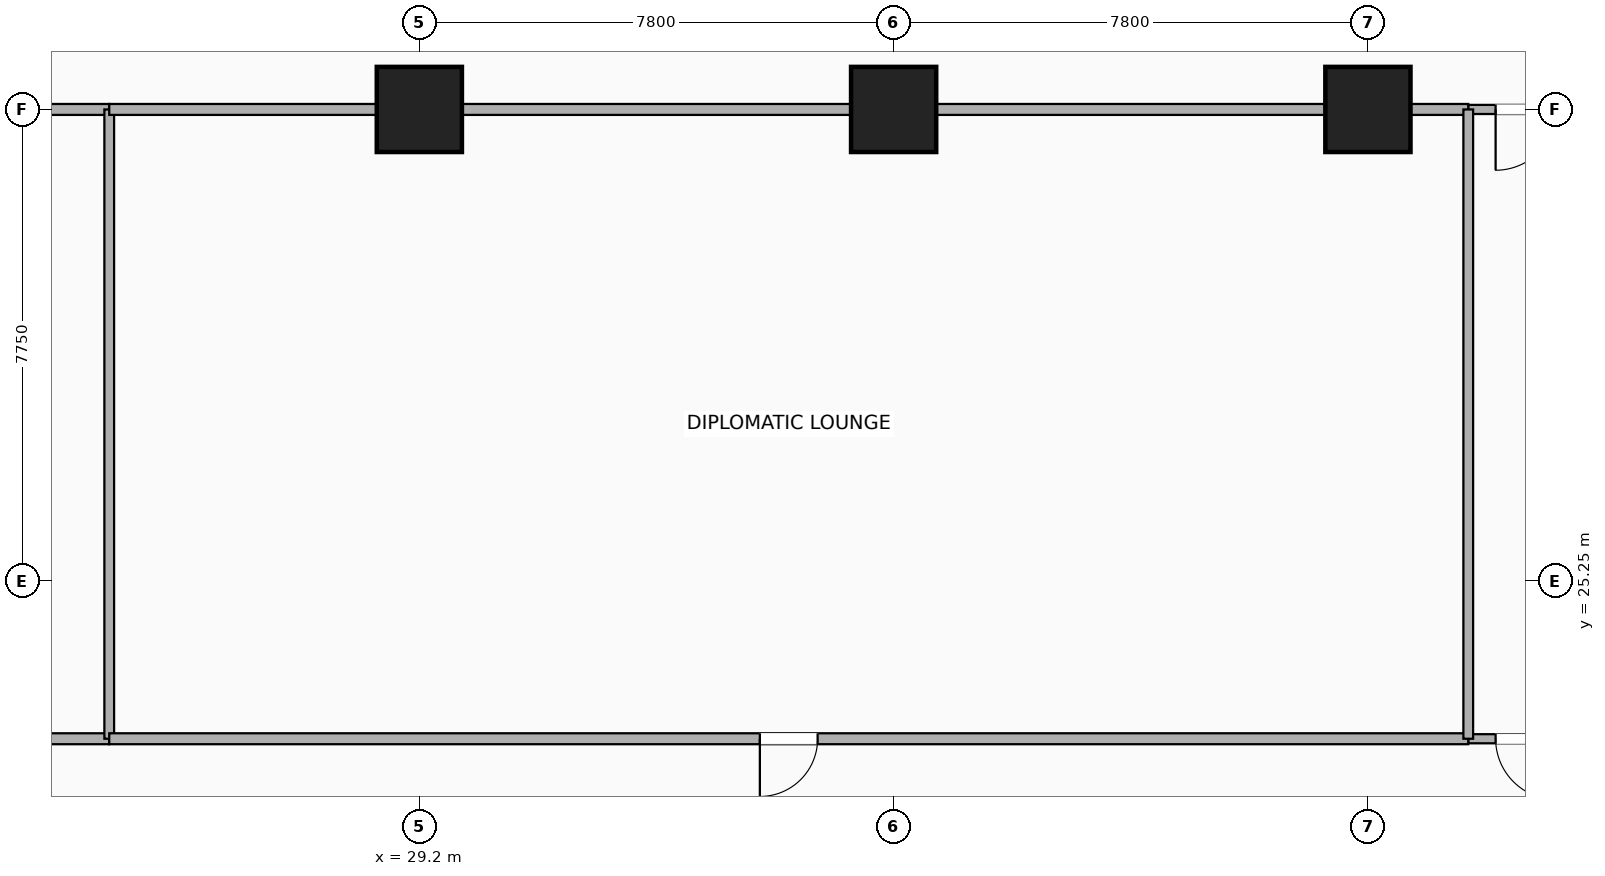
"""IFC4 building model, lengths in metres.
Left out: names, types, materials, properties, quantities, classifications, styles, units other than length and angle.
Written with IfcOpenShell. Run it as: python <this file> out.ifc"""

import sys

from ifc_helpers import new_model, si_unit, direction, frame, frame_2d, origin, origin_2d, place, context, subcontext, project, spatial, rectangle, extrude, element, fill, save


model = new_model("IFC4")
c1 = context("Model", 3, precision=1e-05, world=origin(), true_north=direction((0.0, 1.0)))
c2 = subcontext(c1, "Body", "Model", "MODEL_VIEW")
j1 = project(units=[si_unit("LENGTHUNIT", "METRE"), si_unit("PLANEANGLEUNIT", "RADIAN")], contexts=[c1])
p1 = place(None, origin())
s1 = spatial("IfcSite", under=j1, at=p1, CompositionType="ELEMENT")
p2 = place(p1, origin())
s2 = spatial("IfcBuilding", under=s1, at=p2, CompositionType="ELEMENT")
p3 = place(p2, frame((0.0, 0.0, 64.9)))
s3 = spatial("IfcBuildingStorey", under=s2, at=p3, CompositionType="ELEMENT", Elevation=64.9)
for number, where, z_axis, x_axis in (
    (1, (29.2, 33.0, -0.28), (0.0, 0.0, 1.0), (1.0, 0.0, 0.0)),
    (2, (37.0, 33.0, -0.28), (0.0, 0.0, 1.0), (1.0, 0.0, 0.0)),
    (3, (44.8, 33.0, -0.28), (0.0, 0.0, 1.0), (1.0, 0.0, 0.0)),
):
    element("IfcColumn", number, at=place(p3, frame(where, z_axis=z_axis, x_axis=x_axis)), inside=s3, PredefinedType="COLUMN", context=c2, shape_type="SweptSolid", body=[
        extrude(rectangle(XDim=1.4, YDim=1.4, at=origin_2d()), origin(), (0.0, 0.0, 1.0), 3.5),
    ])
p4 = place(p3, frame((46.45, 22.65, 0.0), z_axis=(0.0, 0.0, 1.0), x_axis=(1.0, 0.0, 0.0)))
e4 = element("IfcWall", 4, at=p4, inside=s3, PredefinedType="PARTITIONING", context=c2, shape_type="SweptSolid", body=[
    extrude(rectangle(XDim=2.0, YDim=0.15, at=frame_2d((1.0, 0.0))), origin(), (0.0, 0.0, 1.0), 3.22),
])
p5 = place(p4, frame((0.45, 0.0, 0.0)))
e5 = element("IfcOpeningElement", 5, at=p5, cuts=e4, PredefinedType="OPENING", context=c2, shape_type="SweptSolid", body=[
    extrude(rectangle(XDim=1.0, YDim=2.15, at=frame_2d((0.5, 1.075))), frame((0.0, 0.085, 0.0), z_axis=(0.0, -1.0, 0.0), x_axis=(1.0, 0.0, 0.0)), (0.0, 0.0, 1.0), 0.17),
])
p6 = place(p3, frame((46.45, 33.0, 0.0), z_axis=(0.0, 0.0, 1.0), x_axis=(1.0, 0.0, 0.0)))
e6 = element("IfcWall", 6, at=p6, inside=s3, PredefinedType="PARTITIONING", context=c2, shape_type="SweptSolid", body=[
    extrude(rectangle(XDim=2.0, YDim=0.15, at=frame_2d((1.0, 0.0))), origin(), (0.0, 0.0, 1.0), 2.51),
])
p7 = place(p6, frame((0.45, 0.0, 0.0)))
e7 = element("IfcOpeningElement", 7, at=p7, cuts=e6, PredefinedType="OPENING", context=c2, shape_type="SweptSolid", body=[
    extrude(rectangle(XDim=1.0, YDim=2.15, at=frame_2d((0.5, 1.075))), frame((0.0, 0.085, 0.0), z_axis=(0.0, -1.0, 0.0), x_axis=(1.0, 0.0, 0.0)), (0.0, 0.0, 1.0), 0.17),
])
p8 = place(p3, frame((18.65, 22.65, 0.0), z_axis=(0.0, 0.0, 1.0), x_axis=(1.0, 0.0, 0.0)))
e8 = element("IfcWall", 8, at=p8, inside=s3, PredefinedType="PARTITIONING", context=c2, shape_type="SweptSolid", body=[
    extrude(rectangle(XDim=5.45, YDim=0.18, at=frame_2d((2.725, 0.0))), origin(), (0.0, 0.0, 1.0), 2.51),
])
p9 = place(p8, frame((2.25, 0.0, 0.0)))
e9 = element("IfcOpeningElement", 9, at=p9, cuts=e8, PredefinedType="OPENING", context=c2, shape_type="SweptSolid", body=[
    extrude(rectangle(XDim=0.95, YDim=2.15, at=frame_2d((0.475, 1.075))), frame((0.0, 0.1, 0.0), z_axis=(0.0, -1.0, 0.0), x_axis=(1.0, 0.0, 0.0)), (0.0, 0.0, 1.0), 0.2),
])
p10 = place(p3, frame((18.65, 33.0, 0.0), z_axis=(0.0, 0.0, 1.0), x_axis=(1.0, 0.0, 0.0)))
e10 = element("IfcWall", 10, at=p10, inside=s3, PredefinedType="PARTITIONING", context=c2, shape_type="SweptSolid", body=[
    extrude(rectangle(XDim=5.45, YDim=0.18, at=frame_2d((2.725, 0.0))), origin(), (0.0, 0.0, 1.0), 2.51),
])
p11 = place(p3, frame((24.1, 22.65, 0.0), z_axis=(0.0, 0.0, 1.0), x_axis=(0.0, 1.0, 0.0)))
e11 = element("IfcWall", 11, at=p11, inside=s3, PredefinedType="PARTITIONING", context=c2, shape_type="SweptSolid", body=[
    extrude(rectangle(XDim=10.35, YDim=0.16, at=frame_2d((5.175, 0.0))), origin(), (0.0, 0.0, 1.0), 2.51),
])
p12 = place(p3, frame((24.1, 22.65, 0.0), z_axis=(0.0, 0.0, 1.0), x_axis=(1.0, 0.0, 0.0)))
e12 = element("IfcWall", 12, at=p12, inside=s3, PredefinedType="PARTITIONING", context=c2, shape_type="SweptSolid", body=[
    extrude(rectangle(XDim=22.35, YDim=0.18, at=frame_2d((11.175, 0.0))), origin(), (0.0, 0.0, 1.0), 2.51),
])
p13 = place(p12, frame((10.7, 0.0, 0.0)))
e13 = element("IfcOpeningElement", 13, at=p13, cuts=e12, PredefinedType="OPENING", context=c2, shape_type="SweptSolid", body=[
    extrude(rectangle(XDim=0.95, YDim=2.15, at=frame_2d((0.475, 1.075))), frame((0.0, 0.1, 0.0), z_axis=(0.0, -1.0, 0.0), x_axis=(1.0, 0.0, 0.0)), (0.0, 0.0, 1.0), 0.2),
])
p14 = place(p3, frame((24.1, 33.0, 0.0), z_axis=(0.0, 0.0, 1.0), x_axis=(1.0, 0.0, 0.0)))
e14 = element("IfcWall", 14, at=p14, inside=s3, PredefinedType="PARTITIONING", context=c2, shape_type="SweptSolid", body=[
    extrude(rectangle(XDim=22.35, YDim=0.18, at=frame_2d((11.175, 0.0))), origin(), (0.0, 0.0, 1.0), 2.51),
])
p15 = place(p3, frame((46.45, 22.65, 0.0), z_axis=(0.0, 0.0, 1.0), x_axis=(0.0, 1.0, 0.0)))
e15 = element("IfcWall", 15, at=p15, inside=s3, PredefinedType="PARTITIONING", context=c2, shape_type="SweptSolid", body=[
    extrude(rectangle(XDim=10.35, YDim=0.16, at=frame_2d((5.175, 0.0))), origin(), (0.0, 0.0, 1.0), 2.51),
])
p16 = place(p5, origin())
e16 = element("IfcDoor", 16, at=p16, inside=s3, OperationType="SINGLE_SWING_RIGHT", PredefinedType="DOOR", context=c2, shape_type="SweptSolid", body=[
    extrude(rectangle(XDim=1.0, YDim=2.15, at=frame_2d((0.5, 1.075))), frame((0.0, 0.025, 0.0), z_axis=(0.0, -1.0, 0.0), x_axis=(1.0, 0.0, 0.0)), (0.0, 0.0, 1.0), 0.05),
])
fill(e5, e16)
p17 = place(p7, origin())
e17 = element("IfcDoor", 17, at=p17, inside=s3, OperationType="SINGLE_SWING_LEFT", PredefinedType="DOOR", context=c2, shape_type="SweptSolid", body=[
    extrude(rectangle(XDim=1.0, YDim=2.15, at=frame_2d((0.5, 1.075))), frame((0.0, 0.025, 0.0), z_axis=(0.0, -1.0, 0.0), x_axis=(1.0, 0.0, 0.0)), (0.0, 0.0, 1.0), 0.05),
])
fill(e7, e17)
p18 = place(p13, origin())
e18 = element("IfcDoor", 18, at=p18, inside=s3, OperationType="SINGLE_SWING_LEFT", PredefinedType="DOOR", context=c2, shape_type="SweptSolid", body=[
    extrude(rectangle(XDim=0.95, YDim=2.15, at=frame_2d((0.475, 1.075))), frame((0.0, 0.025, 0.0), z_axis=(0.0, -1.0, 0.0), x_axis=(1.0, 0.0, 0.0)), (0.0, 0.0, 1.0), 0.05),
])
fill(e13, e18)
save(model, sys.argv[1])
